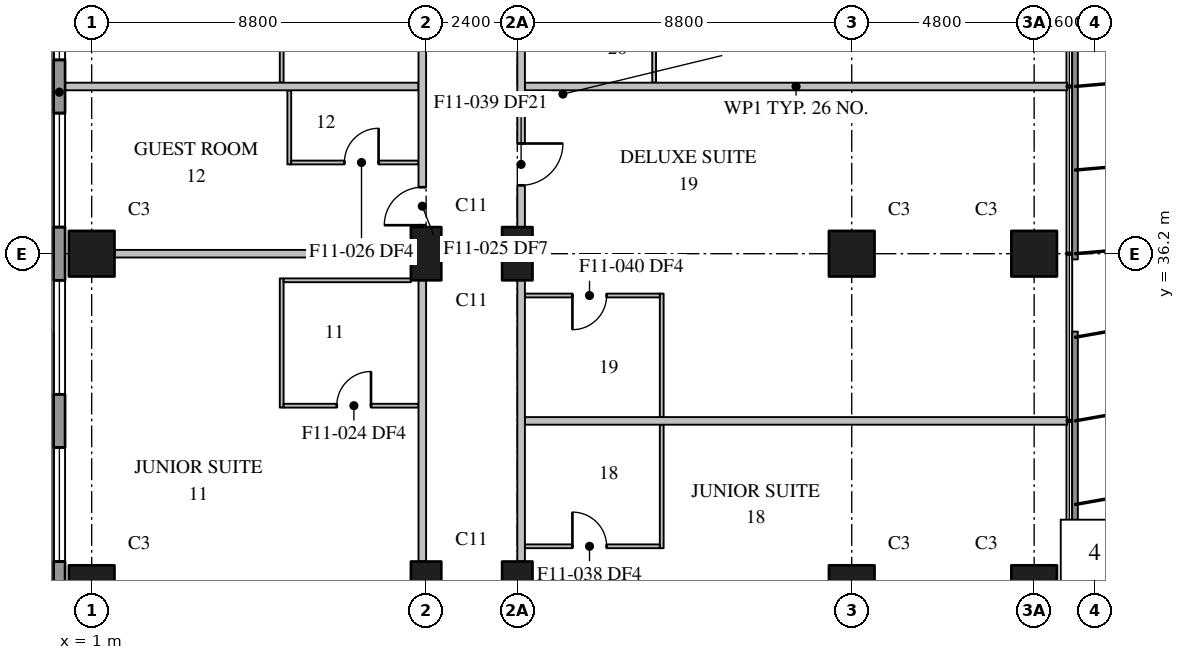
"""IFC4 building model, lengths in metres.
Left out: names, types, materials, properties, quantities, classifications, styles, units other than length and angle.
Written with IfcOpenShell. Run it as: python <this file> out.ifc"""

import sys

from ifc_helpers import new_model, si_unit, direction, frame, frame_2d, origin, origin_2d, place, context, subcontext, project, spatial, rectangle, extrude, element, fill, save


model = new_model("IFC4")
c1 = context("Model", 3, precision=1e-05, world=origin(), true_north=direction((0.0, 1.0)))
c2 = subcontext(c1, "Body", "Model", "MODEL_VIEW")
j1 = project(units=[si_unit("LENGTHUNIT", "METRE"), si_unit("PLANEANGLEUNIT", "RADIAN")], contexts=[c1])
p1 = place(None, origin())
s1 = spatial("IfcSite", under=j1, at=p1, CompositionType="ELEMENT")
p2 = place(p1, origin())
s2 = spatial("IfcBuilding", under=s1, at=p2, CompositionType="ELEMENT")
p3 = place(p2, frame((0.0, 0.0, 107.4)))
s3 = spatial("IfcBuildingStorey", under=s2, at=p3, CompositionType="ELEMENT", Elevation=107.4)
for number, where, z_axis, x_axis in (
    (1, (1.0, 27.4, 0.0), (0.0, 0.0, 1.0), (1.0, 0.0, 0.0)),
    (2, (1.0, 36.2, 0.0), (0.0, 0.0, 1.0), (1.0, 0.0, 0.0)),
):
    element("IfcColumn", number, at=place(p3, frame(where, z_axis=z_axis, x_axis=x_axis)), inside=s3, PredefinedType="COLUMN", context=c2, shape_type="SweptSolid", body=[
        extrude(rectangle(XDim=1.2, YDim=1.2, at=origin_2d()), origin(), (0.0, 0.0, 1.0), 3.7),
    ])
for number, where, z_axis, x_axis in (
    (3, (9.8, 27.4, 0.0), (0.0, 0.0, 1.0), (0.0, 1.0, 0.0)),
    (4, (9.8, 36.2, 0.0), (0.0, 0.0, 1.0), (0.0, 1.0, 0.0)),
    (5, (12.2, 27.4, 0.0), (0.0, 0.0, 1.0), (0.0, 1.0, 0.0)),
    (6, (12.2, 36.2, 0.0), (0.0, 0.0, 1.0), (0.0, 1.0, 0.0)),
):
    element("IfcColumn", number, at=place(p3, frame(where, z_axis=z_axis, x_axis=x_axis)), inside=s3, PredefinedType="COLUMN", context=c2, shape_type="SweptSolid", body=[
        extrude(rectangle(XDim=1.4, YDim=0.8, at=origin_2d()), origin(), (0.0, 0.0, 1.0), 3.7),
    ])
for number, where, z_axis, x_axis in (
    (7, (21.0, 27.4, 0.0), (0.0, 0.0, 1.0), (1.0, 0.0, 0.0)),
    (8, (21.0, 36.2, 0.0), (0.0, 0.0, 1.0), (1.0, 0.0, 0.0)),
    (9, (25.8, 27.4, 0.0), (0.0, 0.0, 1.0), (1.0, 0.0, 0.0)),
    (10, (25.8, 36.2, 0.0), (0.0, 0.0, 1.0), (1.0, 0.0, 0.0)),
):
    element("IfcColumn", number, at=place(p3, frame(where, z_axis=z_axis, x_axis=x_axis)), inside=s3, PredefinedType="COLUMN", context=c2, shape_type="SweptSolid", body=[
        extrude(rectangle(XDim=1.2, YDim=1.2, at=origin_2d()), origin(), (0.0, 0.0, 1.0), 3.7),
    ])
p4 = place(p3, frame((0.15, 78.7, 0.0), z_axis=(0.0, 0.0, 1.0), x_axis=(0.0, -1.0, 0.0)))
e11 = element("IfcWall", 11, at=p4, inside=s3, PredefinedType="STANDARD", context=c2, shape_type="SweptSolid", body=[
    extrude(rectangle(XDim=76.5, YDim=0.3, at=frame_2d((38.25, 0.0))), origin(), (0.0, 0.0, 1.0), 3.4),
])
p5 = place(p4, frame((3.6, 0.0, 0.75)))
e12 = element("IfcOpeningElement", 12, at=p5, cuts=e11, PredefinedType="OPENING", context=c2, shape_type="SweptSolid", body=[
    extrude(rectangle(XDim=3.0, YDim=2.3, at=frame_2d((1.5, 1.15))), frame((0.0, 0.16, 0.0), z_axis=(0.0, -1.0, 0.0), x_axis=(1.0, 0.0, 0.0)), (0.0, 0.0, 1.0), 0.32),
])
p6 = place(p4, frame((8.0, 0.0, 0.75)))
e13 = element("IfcOpeningElement", 13, at=p6, cuts=e11, PredefinedType="OPENING", context=c2, shape_type="SweptSolid", body=[
    extrude(rectangle(XDim=3.0, YDim=2.3, at=frame_2d((1.5, 1.15))), frame((0.0, 0.16, 0.0), z_axis=(0.0, -1.0, 0.0), x_axis=(1.0, 0.0, 0.0)), (0.0, 0.0, 1.0), 0.32),
])
p7 = place(p4, frame((12.4, 0.0, 0.75)))
e14 = element("IfcOpeningElement", 14, at=p7, cuts=e11, PredefinedType="OPENING", context=c2, shape_type="SweptSolid", body=[
    extrude(rectangle(XDim=3.0, YDim=2.3, at=frame_2d((1.5, 1.15))), frame((0.0, 0.16, 0.0), z_axis=(0.0, -1.0, 0.0), x_axis=(1.0, 0.0, 0.0)), (0.0, 0.0, 1.0), 0.32),
])
p8 = place(p4, frame((16.8, 0.0, 0.75)))
e15 = element("IfcOpeningElement", 15, at=p8, cuts=e11, PredefinedType="OPENING", context=c2, shape_type="SweptSolid", body=[
    extrude(rectangle(XDim=3.0, YDim=2.3, at=frame_2d((1.5, 1.15))), frame((0.0, 0.16, 0.0), z_axis=(0.0, -1.0, 0.0), x_axis=(1.0, 0.0, 0.0)), (0.0, 0.0, 1.0), 0.32),
])
p9 = place(p4, frame((21.2, 0.0, 0.75)))
e16 = element("IfcOpeningElement", 16, at=p9, cuts=e11, PredefinedType="OPENING", context=c2, shape_type="SweptSolid", body=[
    extrude(rectangle(XDim=3.0, YDim=2.3, at=frame_2d((1.5, 1.15))), frame((0.0, 0.16, 0.0), z_axis=(0.0, -1.0, 0.0), x_axis=(1.0, 0.0, 0.0)), (0.0, 0.0, 1.0), 0.32),
])
p10 = place(p4, frame((25.6, 0.0, 0.75)))
e17 = element("IfcOpeningElement", 17, at=p10, cuts=e11, PredefinedType="OPENING", context=c2, shape_type="SweptSolid", body=[
    extrude(rectangle(XDim=3.0, YDim=2.3, at=frame_2d((1.5, 1.15))), frame((0.0, 0.16, 0.0), z_axis=(0.0, -1.0, 0.0), x_axis=(1.0, 0.0, 0.0)), (0.0, 0.0, 1.0), 0.32),
])
p11 = place(p4, frame((30.0, 0.0, 0.75)))
e18 = element("IfcOpeningElement", 18, at=p11, cuts=e11, PredefinedType="OPENING", context=c2, shape_type="SweptSolid", body=[
    extrude(rectangle(XDim=3.0, YDim=2.3, at=frame_2d((1.5, 1.15))), frame((0.0, 0.16, 0.0), z_axis=(0.0, -1.0, 0.0), x_axis=(1.0, 0.0, 0.0)), (0.0, 0.0, 1.0), 0.32),
])
p12 = place(p4, frame((34.4, 0.0, 0.75)))
e19 = element("IfcOpeningElement", 19, at=p12, cuts=e11, PredefinedType="OPENING", context=c2, shape_type="SweptSolid", body=[
    extrude(rectangle(XDim=3.0, YDim=2.3, at=frame_2d((1.5, 1.15))), frame((0.0, 0.16, 0.0), z_axis=(0.0, -1.0, 0.0), x_axis=(1.0, 0.0, 0.0)), (0.0, 0.0, 1.0), 0.32),
])
p13 = place(p4, frame((38.8, 0.0, 0.75)))
e20 = element("IfcOpeningElement", 20, at=p13, cuts=e11, PredefinedType="OPENING", context=c2, shape_type="SweptSolid", body=[
    extrude(rectangle(XDim=3.0, YDim=2.3, at=frame_2d((1.5, 1.15))), frame((0.0, 0.16, 0.0), z_axis=(0.0, -1.0, 0.0), x_axis=(1.0, 0.0, 0.0)), (0.0, 0.0, 1.0), 0.32),
])
p14 = place(p4, frame((43.2, 0.0, 0.75)))
e21 = element("IfcOpeningElement", 21, at=p14, cuts=e11, PredefinedType="OPENING", context=c2, shape_type="SweptSolid", body=[
    extrude(rectangle(XDim=3.0, YDim=2.3, at=frame_2d((1.5, 1.15))), frame((0.0, 0.16, 0.0), z_axis=(0.0, -1.0, 0.0), x_axis=(1.0, 0.0, 0.0)), (0.0, 0.0, 1.0), 0.32),
])
p15 = place(p4, frame((47.6, 0.0, 0.75)))
e22 = element("IfcOpeningElement", 22, at=p15, cuts=e11, PredefinedType="OPENING", context=c2, shape_type="SweptSolid", body=[
    extrude(rectangle(XDim=3.0, YDim=2.3, at=frame_2d((1.5, 1.15))), frame((0.0, 0.16, 0.0), z_axis=(0.0, -1.0, 0.0), x_axis=(1.0, 0.0, 0.0)), (0.0, 0.0, 1.0), 0.32),
])
p16 = place(p4, frame((52.0, 0.0, 0.75)))
e23 = element("IfcOpeningElement", 23, at=p16, cuts=e11, PredefinedType="OPENING", context=c2, shape_type="SweptSolid", body=[
    extrude(rectangle(XDim=3.0, YDim=2.3, at=frame_2d((1.5, 1.15))), frame((0.0, 0.16, 0.0), z_axis=(0.0, -1.0, 0.0), x_axis=(1.0, 0.0, 0.0)), (0.0, 0.0, 1.0), 0.32),
])
p17 = place(p4, frame((56.4, 0.0, 0.75)))
e24 = element("IfcOpeningElement", 24, at=p17, cuts=e11, PredefinedType="OPENING", context=c2, shape_type="SweptSolid", body=[
    extrude(rectangle(XDim=3.0, YDim=2.3, at=frame_2d((1.5, 1.15))), frame((0.0, 0.16, 0.0), z_axis=(0.0, -1.0, 0.0), x_axis=(1.0, 0.0, 0.0)), (0.0, 0.0, 1.0), 0.32),
])
p18 = place(p4, frame((60.8, 0.0, 0.75)))
e25 = element("IfcOpeningElement", 25, at=p18, cuts=e11, PredefinedType="OPENING", context=c2, shape_type="SweptSolid", body=[
    extrude(rectangle(XDim=3.0, YDim=2.3, at=frame_2d((1.5, 1.15))), frame((0.0, 0.16, 0.0), z_axis=(0.0, -1.0, 0.0), x_axis=(1.0, 0.0, 0.0)), (0.0, 0.0, 1.0), 0.32),
])
p19 = place(p4, frame((65.2, 0.0, 0.75)))
e26 = element("IfcOpeningElement", 26, at=p19, cuts=e11, PredefinedType="OPENING", context=c2, shape_type="SweptSolid", body=[
    extrude(rectangle(XDim=3.0, YDim=2.3, at=frame_2d((1.5, 1.15))), frame((0.0, 0.16, 0.0), z_axis=(0.0, -1.0, 0.0), x_axis=(1.0, 0.0, 0.0)), (0.0, 0.0, 1.0), 0.32),
])
p20 = place(p4, frame((69.6, 0.0, 0.75)))
e27 = element("IfcOpeningElement", 27, at=p20, cuts=e11, PredefinedType="OPENING", context=c2, shape_type="SweptSolid", body=[
    extrude(rectangle(XDim=3.0, YDim=2.3, at=frame_2d((1.5, 1.15))), frame((0.0, 0.16, 0.0), z_axis=(0.0, -1.0, 0.0), x_axis=(1.0, 0.0, 0.0)), (0.0, 0.0, 1.0), 0.32),
])
p21 = place(p3, frame((9.7, 28.1, 0.0), z_axis=(0.0, 0.0, 1.0), x_axis=(0.0, 1.0, 0.0)))
e28 = element("IfcWall", 28, at=p21, inside=s3, PredefinedType="PARTITIONING", context=c2, shape_type="SweptSolid", body=[
    extrude(rectangle(XDim=7.4, YDim=0.2, at=frame_2d((3.7, 0.0))), origin(), (0.0, 0.0, 1.0), 3.4),
])
p22 = place(p3, frame((9.7, 36.9, 0.0), z_axis=(0.0, 0.0, 1.0), x_axis=(0.0, 1.0, 0.0)))
e29 = element("IfcWall", 29, at=p22, inside=s3, PredefinedType="PARTITIONING", context=c2, shape_type="SweptSolid", body=[
    extrude(rectangle(XDim=7.4, YDim=0.2, at=frame_2d((3.7, 0.0))), origin(), (0.0, 0.0, 1.0), 3.4),
])
p23 = place(p22, frame((0.05, 0.0, 0.0)))
e30 = element("IfcOpeningElement", 30, at=p23, cuts=e29, PredefinedType="OPENING", context=c2, shape_type="SweptSolid", body=[
    extrude(rectangle(XDim=1.0, YDim=2.1, at=frame_2d((0.5, 1.05))), frame((0.0, 0.11, 0.0), z_axis=(0.0, -1.0, 0.0), x_axis=(1.0, 0.0, 0.0)), (0.0, 0.0, 1.0), 0.22),
])
p24 = place(p3, frame((1.6, 36.2, 0.0), z_axis=(0.0, 0.0, 1.0), x_axis=(1.0, 0.0, 0.0)))
e31 = element("IfcWall", 31, at=p24, inside=s3, PredefinedType="PARTITIONING", context=c2, shape_type="SweptSolid", body=[
    extrude(rectangle(XDim=7.8, YDim=0.2, at=frame_2d((3.9, 0.0))), origin(), (0.0, 0.0, 1.0), 3.4),
])
p25 = place(p3, frame((0.31, 40.6, 0.0), z_axis=(0.0, 0.0, 1.0), x_axis=(1.0, 0.0, 0.0)))
e32 = element("IfcWall", 32, at=p25, inside=s3, PredefinedType="PARTITIONING", context=c2, shape_type="SweptSolid", body=[
    extrude(rectangle(XDim=9.29, YDim=0.2, at=frame_2d((4.645, 0.0))), origin(), (0.0, 0.0, 1.0), 3.4),
])
p26 = place(p3, frame((12.4, 40.6, 0.0), z_axis=(0.0, 0.0, 1.0), x_axis=(1.0, 0.0, 0.0)))
e33 = element("IfcWall", 33, at=p26, inside=s3, PredefinedType="PARTITIONING", context=c2, shape_type="SweptSolid", body=[
    extrude(rectangle(XDim=14.27, YDim=0.2, at=frame_2d((7.135, 0.0))), origin(), (0.0, 0.0, 1.0), 3.4),
])
p27 = place(p3, frame((12.3, 28.1, 0.0), z_axis=(0.0, 0.0, 1.0), x_axis=(0.0, 1.0, 0.0)))
e34 = element("IfcWall", 34, at=p27, inside=s3, PredefinedType="PARTITIONING", context=c2, shape_type="SweptSolid", body=[
    extrude(rectangle(XDim=7.4, YDim=0.2, at=frame_2d((3.7, 0.0))), origin(), (0.0, 0.0, 1.0), 3.4),
])
p28 = place(p3, frame((12.3, 44.3, 0.0), z_axis=(0.0, 0.0, 1.0), x_axis=(0.0, -1.0, 0.0)))
e35 = element("IfcWall", 35, at=p28, inside=s3, PredefinedType="PARTITIONING", context=c2, shape_type="SweptSolid", body=[
    extrude(rectangle(XDim=7.4, YDim=0.2, at=frame_2d((3.7, 0.0))), origin(), (0.0, 0.0, 1.0), 3.4),
])
p29 = place(p28, frame((5.2, 0.0, 0.0)))
e36 = element("IfcOpeningElement", 36, at=p29, cuts=e35, PredefinedType="OPENING", context=c2, shape_type="SweptSolid", body=[
    extrude(rectangle(XDim=1.1, YDim=2.1, at=frame_2d((0.55, 1.05))), frame((0.0, 0.11, 0.0), z_axis=(0.0, -1.0, 0.0), x_axis=(1.0, 0.0, 0.0)), (0.0, 0.0, 1.0), 0.22),
])
p30 = place(p28, frame((0.05, 0.0, 0.0)))
e37 = element("IfcOpeningElement", 37, at=p30, cuts=e35, PredefinedType="OPENING", context=c2, shape_type="SweptSolid", body=[
    extrude(rectangle(XDim=1.0, YDim=2.1, at=frame_2d((0.5, 1.05))), frame((0.0, 0.11, 0.0), z_axis=(0.0, -1.0, 0.0), x_axis=(1.0, 0.0, 0.0)), (0.0, 0.0, 1.0), 0.22),
])
p31 = place(p3, frame((12.4, 31.8, 0.0), z_axis=(0.0, 0.0, 1.0), x_axis=(1.0, 0.0, 0.0)))
e38 = element("IfcWall", 38, at=p31, inside=s3, PredefinedType="PARTITIONING", context=c2, shape_type="SweptSolid", body=[
    extrude(rectangle(XDim=14.27, YDim=0.2, at=frame_2d((7.135, 0.0))), origin(), (0.0, 0.0, 1.0), 3.4),
])
p32 = place(p3, frame((6.2, 38.55, 0.0), z_axis=(0.0, 0.0, 1.0), x_axis=(0.0, 1.0, 0.0)))
e39 = element("IfcWall", 39, at=p32, inside=s3, PredefinedType="PARTITIONING", context=c2, shape_type="SweptSolid", body=[
    extrude(rectangle(XDim=1.95, YDim=0.1, at=frame_2d((0.975, 0.0))), origin(), (0.0, 0.0, 1.0), 3.4),
])
p33 = place(p3, frame((6.0, 32.15, 0.0), z_axis=(0.0, 0.0, 1.0), x_axis=(0.0, 1.0, 0.0)))
e40 = element("IfcWall", 40, at=p33, inside=s3, PredefinedType="PARTITIONING", context=c2, shape_type="SweptSolid", body=[
    extrude(rectangle(XDim=3.4, YDim=0.1, at=frame_2d((1.7, 0.0))), origin(), (0.0, 0.0, 1.0), 3.4),
])
p34 = place(p3, frame((6.0, 40.7, 0.0), z_axis=(0.0, 0.0, 1.0), x_axis=(0.0, 1.0, 0.0)))
e41 = element("IfcWall", 41, at=p34, inside=s3, PredefinedType="PARTITIONING", context=c2, shape_type="SweptSolid", body=[
    extrude(rectangle(XDim=3.25, YDim=0.1, at=frame_2d((1.625, 0.0))), origin(), (0.0, 0.0, 1.0), 3.4),
])
p35 = place(p3, frame((6.05, 32.2, 0.0), z_axis=(0.0, 0.0, 1.0), x_axis=(1.0, 0.0, 0.0)))
e42 = element("IfcWall", 42, at=p35, inside=s3, PredefinedType="PARTITIONING", context=c2, shape_type="SweptSolid", body=[
    extrude(rectangle(XDim=3.55, YDim=0.1, at=frame_2d((1.775, 0.0))), origin(), (0.0, 0.0, 1.0), 3.4),
])
p36 = place(p35, frame((1.4, 0.0, 0.0)))
e43 = element("IfcOpeningElement", 43, at=p36, cuts=e42, PredefinedType="OPENING", context=c2, shape_type="SweptSolid", body=[
    extrude(rectangle(XDim=0.9, YDim=2.1, at=frame_2d((0.45, 1.05))), frame((0.0, 0.06, 0.0), z_axis=(0.0, -1.0, 0.0), x_axis=(1.0, 0.0, 0.0)), (0.0, 0.0, 1.0), 0.12),
])
p37 = place(p3, frame((6.05, 35.5, 0.0), z_axis=(0.0, 0.0, 1.0), x_axis=(1.0, 0.0, 0.0)))
e44 = element("IfcWall", 44, at=p37, inside=s3, PredefinedType="PARTITIONING", context=c2, shape_type="SweptSolid", body=[
    extrude(rectangle(XDim=3.35, YDim=0.1, at=frame_2d((1.675, 0.0))), origin(), (0.0, 0.0, 1.0), 3.4),
])
p38 = place(p3, frame((6.25, 38.6, 0.0), z_axis=(0.0, 0.0, 1.0), x_axis=(1.0, 0.0, 0.0)))
e45 = element("IfcWall", 45, at=p38, inside=s3, PredefinedType="PARTITIONING", context=c2, shape_type="SweptSolid", body=[
    extrude(rectangle(XDim=3.35, YDim=0.1, at=frame_2d((1.675, 0.0))), origin(), (0.0, 0.0, 1.0), 3.4),
])
p39 = place(p38, frame((1.4, 0.0, 0.0)))
e46 = element("IfcOpeningElement", 46, at=p39, cuts=e45, PredefinedType="OPENING", context=c2, shape_type="SweptSolid", body=[
    extrude(rectangle(XDim=0.9, YDim=2.1, at=frame_2d((0.45, 1.05))), frame((0.0, 0.06, 0.0), z_axis=(0.0, -1.0, 0.0), x_axis=(1.0, 0.0, 0.0)), (0.0, 0.0, 1.0), 0.12),
])
for number, where, z_axis, x_axis in (
    (47, (16.0, 28.45, 0.0), (0.0, 0.0, 1.0), (0.0, 1.0, 0.0)),
    (48, (16.0, 31.9, 0.0), (0.0, 0.0, 1.0), (0.0, 1.0, 0.0)),
):
    element("IfcWall", number, at=place(p3, frame(where, z_axis=z_axis, x_axis=x_axis)), inside=s3, PredefinedType="PARTITIONING", context=c2, shape_type="SweptSolid", body=[
        extrude(rectangle(XDim=3.25, YDim=0.1, at=frame_2d((1.625, 0.0))), origin(), (0.0, 0.0, 1.0), 3.4),
    ])
p40 = place(p3, frame((12.4, 28.5, 0.0), z_axis=(0.0, 0.0, 1.0), x_axis=(1.0, 0.0, 0.0)))
e49 = element("IfcWall", 49, at=p40, inside=s3, PredefinedType="PARTITIONING", context=c2, shape_type="SweptSolid", body=[
    extrude(rectangle(XDim=3.55, YDim=0.1, at=frame_2d((1.775, 0.0))), origin(), (0.0, 0.0, 1.0), 3.4),
])
p41 = place(p40, frame((1.25, 0.0, 0.0)))
e50 = element("IfcOpeningElement", 50, at=p41, cuts=e49, PredefinedType="OPENING", context=c2, shape_type="SweptSolid", body=[
    extrude(rectangle(XDim=0.9, YDim=2.1, at=frame_2d((0.45, 1.05))), frame((0.0, 0.06, 0.0), z_axis=(0.0, -1.0, 0.0), x_axis=(1.0, 0.0, 0.0)), (0.0, 0.0, 1.0), 0.12),
])
p42 = place(p3, frame((15.95, 35.1, 0.0), z_axis=(0.0, 0.0, 1.0), x_axis=(-1.0, 0.0, 0.0)))
e51 = element("IfcWall", 51, at=p42, inside=s3, PredefinedType="PARTITIONING", context=c2, shape_type="SweptSolid", body=[
    extrude(rectangle(XDim=3.55, YDim=0.1, at=frame_2d((1.775, 0.0))), origin(), (0.0, 0.0, 1.0), 3.4),
])
p43 = place(p42, frame((1.4, 0.0, 0.0)))
e52 = element("IfcOpeningElement", 52, at=p43, cuts=e51, PredefinedType="OPENING", context=c2, shape_type="SweptSolid", body=[
    extrude(rectangle(XDim=0.9, YDim=2.1, at=frame_2d((0.45, 1.05))), frame((0.0, 0.06, 0.0), z_axis=(0.0, -1.0, 0.0), x_axis=(1.0, 0.0, 0.0)), (0.0, 0.0, 1.0), 0.12),
])
p44 = place(p3, frame((15.8, 40.7, 0.0), z_axis=(0.0, 0.0, 1.0), x_axis=(0.0, 1.0, 0.0)))
e53 = element("IfcWall", 53, at=p44, inside=s3, PredefinedType="PARTITIONING", context=c2, shape_type="SweptSolid", body=[
    extrude(rectangle(XDim=1.95, YDim=0.1, at=frame_2d((0.975, 0.0))), origin(), (0.0, 0.0, 1.0), 3.4),
])
p45 = place(p12, origin())
e54 = element("IfcWindow", 54, at=p45, inside=s3, PartitioningType="SINGLE_PANEL", PredefinedType="WINDOW", context=c2, shape_type="SweptSolid", body=[
    extrude(rectangle(XDim=3.0, YDim=2.3, at=frame_2d((1.5, 1.15))), frame((0.0, 0.03, 0.0), z_axis=(0.0, -1.0, 0.0), x_axis=(1.0, 0.0, 0.0)), (0.0, 0.0, 1.0), 0.06),
])
fill(e19, e54)
p46 = place(p13, origin())
e55 = element("IfcWindow", 55, at=p46, inside=s3, PartitioningType="SINGLE_PANEL", PredefinedType="WINDOW", context=c2, shape_type="SweptSolid", body=[
    extrude(rectangle(XDim=3.0, YDim=2.3, at=frame_2d((1.5, 1.15))), frame((0.0, 0.03, 0.0), z_axis=(0.0, -1.0, 0.0), x_axis=(1.0, 0.0, 0.0)), (0.0, 0.0, 1.0), 0.06),
])
fill(e20, e55)
p47 = place(p14, origin())
e56 = element("IfcWindow", 56, at=p47, inside=s3, PartitioningType="SINGLE_PANEL", PredefinedType="WINDOW", context=c2, shape_type="SweptSolid", body=[
    extrude(rectangle(XDim=3.0, YDim=2.3, at=frame_2d((1.5, 1.15))), frame((0.0, 0.03, 0.0), z_axis=(0.0, -1.0, 0.0), x_axis=(1.0, 0.0, 0.0)), (0.0, 0.0, 1.0), 0.06),
])
fill(e21, e56)
p48 = place(p15, origin())
e57 = element("IfcWindow", 57, at=p48, inside=s3, PartitioningType="SINGLE_PANEL", PredefinedType="WINDOW", context=c2, shape_type="SweptSolid", body=[
    extrude(rectangle(XDim=3.0, YDim=2.3, at=frame_2d((1.5, 1.15))), frame((0.0, 0.03, 0.0), z_axis=(0.0, -1.0, 0.0), x_axis=(1.0, 0.0, 0.0)), (0.0, 0.0, 1.0), 0.06),
])
fill(e22, e57)
p49 = place(p36, origin())
e58 = element("IfcDoor", 58, at=p49, inside=s3, OperationType="SINGLE_SWING_RIGHT", PredefinedType="DOOR", context=c2, shape_type="SweptSolid", body=[
    extrude(rectangle(XDim=0.9, YDim=2.1, at=frame_2d((0.45, 1.05))), frame((0.0, 0.025, 0.0), z_axis=(0.0, -1.0, 0.0), x_axis=(1.0, 0.0, 0.0)), (0.0, 0.0, 1.0), 0.05),
])
fill(e43, e58)
p50 = place(p23, origin())
e59 = element("IfcDoor", 59, at=p50, inside=s3, OperationType="SINGLE_SWING_LEFT", PredefinedType="DOOR", context=c2, shape_type="SweptSolid", body=[
    extrude(rectangle(XDim=1.0, YDim=2.1, at=frame_2d((0.5, 1.05))), frame((0.0, 0.025, 0.0), z_axis=(0.0, -1.0, 0.0), x_axis=(1.0, 0.0, 0.0)), (0.0, 0.0, 1.0), 0.05),
])
fill(e30, e59)
p51 = place(p39, origin())
e60 = element("IfcDoor", 60, at=p51, inside=s3, OperationType="SINGLE_SWING_RIGHT", PredefinedType="DOOR", context=c2, shape_type="SweptSolid", body=[
    extrude(rectangle(XDim=0.9, YDim=2.1, at=frame_2d((0.45, 1.05))), frame((0.0, 0.025, 0.0), z_axis=(0.0, -1.0, 0.0), x_axis=(1.0, 0.0, 0.0)), (0.0, 0.0, 1.0), 0.05),
])
fill(e46, e60)
p52 = place(p41, origin())
e61 = element("IfcDoor", 61, at=p52, inside=s3, OperationType="SINGLE_SWING_LEFT", PredefinedType="DOOR", context=c2, shape_type="SweptSolid", body=[
    extrude(rectangle(XDim=0.9, YDim=2.1, at=frame_2d((0.45, 1.05))), frame((0.0, 0.025, 0.0), z_axis=(0.0, -1.0, 0.0), x_axis=(1.0, 0.0, 0.0)), (0.0, 0.0, 1.0), 0.05),
])
fill(e50, e61)
p53 = place(p29, origin())
e62 = element("IfcDoor", 62, at=p53, inside=s3, OperationType="SINGLE_SWING_LEFT", PredefinedType="DOOR", context=c2, shape_type="SweptSolid", body=[
    extrude(rectangle(XDim=1.1, YDim=2.1, at=frame_2d((0.55, 1.05))), frame((0.0, 0.025, 0.0), z_axis=(0.0, -1.0, 0.0), x_axis=(1.0, 0.0, 0.0)), (0.0, 0.0, 1.0), 0.05),
])
fill(e36, e62)
p54 = place(p43, origin())
e63 = element("IfcDoor", 63, at=p54, inside=s3, OperationType="SINGLE_SWING_RIGHT", PredefinedType="DOOR", context=c2, shape_type="SweptSolid", body=[
    extrude(rectangle(XDim=0.9, YDim=2.1, at=frame_2d((0.45, 1.05))), frame((0.0, 0.025, 0.0), z_axis=(0.0, -1.0, 0.0), x_axis=(1.0, 0.0, 0.0)), (0.0, 0.0, 1.0), 0.05),
])
fill(e52, e63)
save(model, sys.argv[1])
